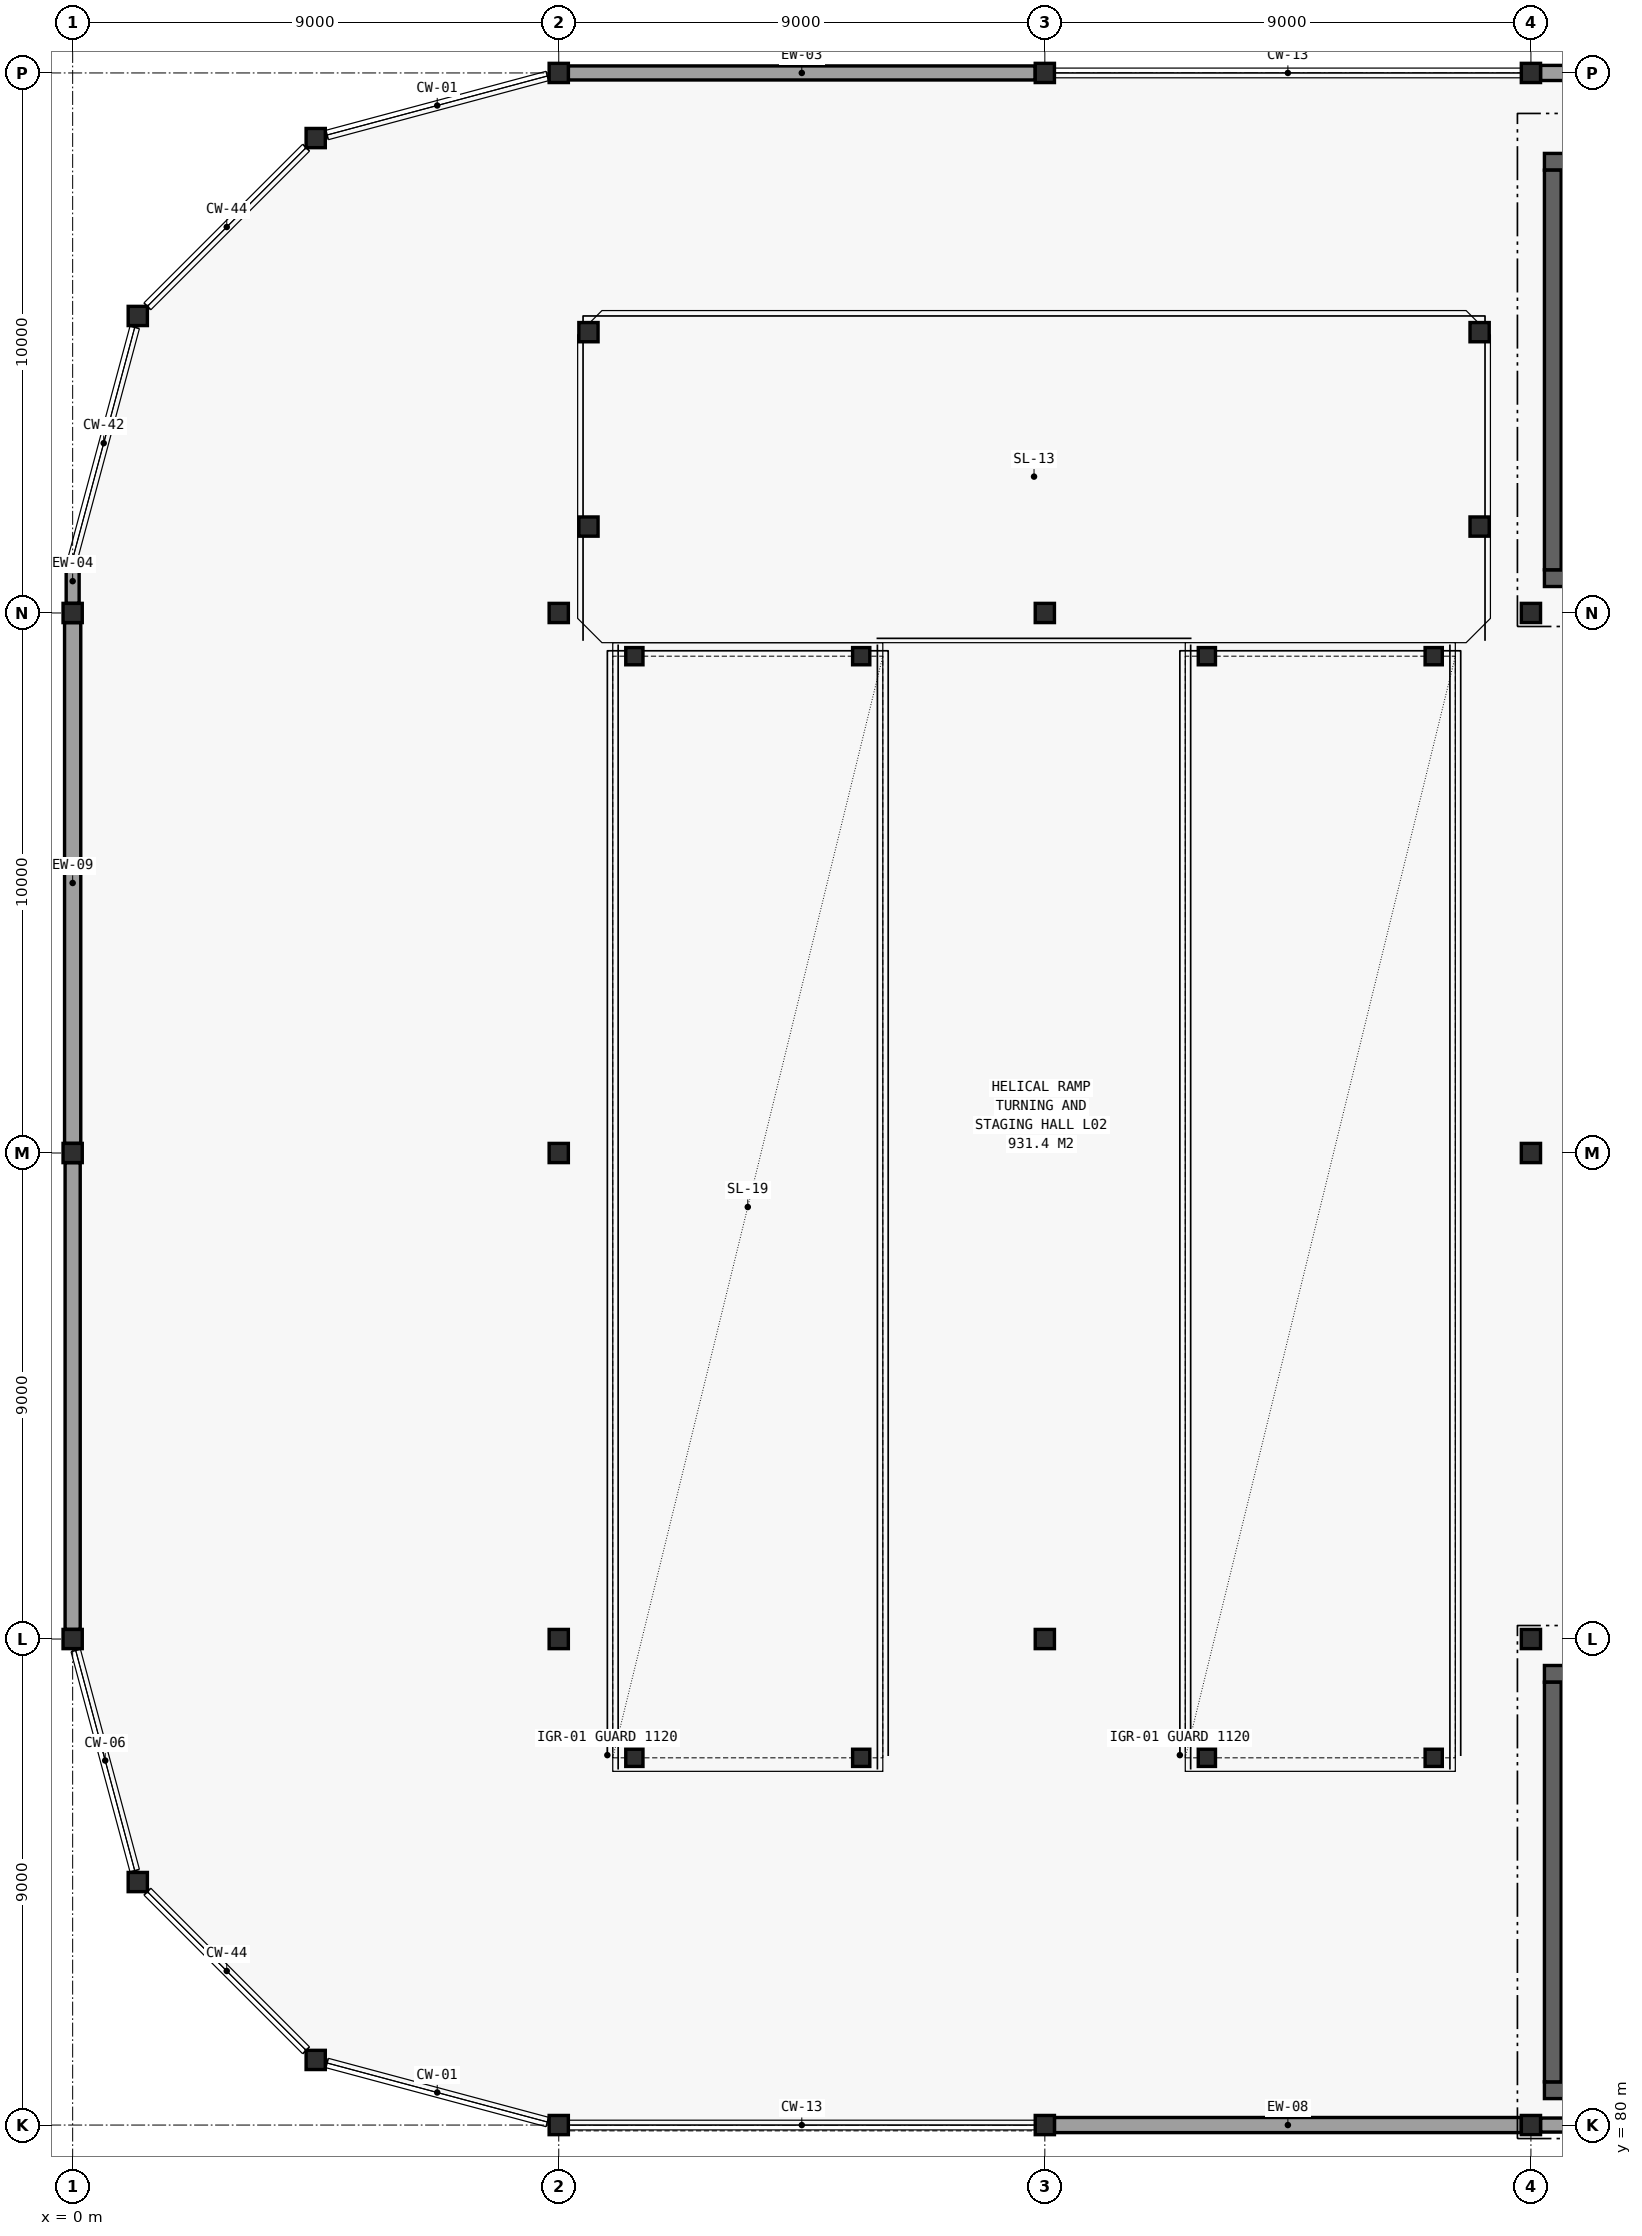
"""IFC4 building model, lengths in metres.
Left out: names, types, materials, properties, quantities, classifications, styles, units other than length and angle.
Written with IfcOpenShell. Run it as: python <this file> out.ifc"""

import sys

from ifc_helpers import new_model, si_unit, direction, frame, frame_2d, origin, origin_2d, place, context, subcontext, project, spatial, rectangle, hollow_circle, extrude, element, save


model = new_model("IFC4")
c1 = context("Model", 3, precision=1e-05, world=origin(), true_north=direction((0.0, 1.0)))
c2 = subcontext(c1, "Body", "Model", "MODEL_VIEW")
j1 = project(units=[si_unit("LENGTHUNIT", "METRE"), si_unit("PLANEANGLEUNIT", "RADIAN")], contexts=[c1])
p1 = place(None, origin())
s1 = spatial("IfcSite", under=j1, at=p1, CompositionType="ELEMENT")
p2 = place(p1, origin())
s2 = spatial("IfcBuilding", under=s1, at=p2, CompositionType="ELEMENT")
p3 = place(p2, frame((0.0, 0.0, 9.3)))
s3 = spatial("IfcBuildingStorey", under=s2, at=p3, CompositionType="ELEMENT", Elevation=9.3)
for number, where, z_axis, x_axis in (
    (1, (0.0, 89.0, 0.0), (0.0, 0.0, 1.0), (1.0, 0.0, 0.0)),
    (2, (0.0, 98.0, 0.0), (0.0, 0.0, 1.0), (1.0, 0.0, 0.0)),
    (3, (0.0, 108.0, 0.0), (0.0, 0.0, 1.0), (1.0, 0.0, 0.0)),
    (4, (1.206, 84.5, 0.0), (0.0, 0.0, 1.0), (1.0, 0.0, 0.0)),
    (5, (1.206, 113.5, 0.0), (0.0, 0.0, 1.0), (1.0, 0.0, 0.0)),
    (6, (4.5, 81.206, 0.0), (0.0, 0.0, 1.0), (1.0, 0.0, 0.0)),
    (7, (4.5, 116.794, 0.0), (0.0, 0.0, 1.0), (1.0, 0.0, 0.0)),
    (8, (9.0, 80.0, 0.0), (0.0, 0.0, 1.0), (1.0, 0.0, 0.0)),
    (9, (9.0, 89.0, 0.0), (0.0, 0.0, 1.0), (1.0, 0.0, 0.0)),
    (10, (9.0, 98.0, 0.0), (0.0, 0.0, 1.0), (1.0, 0.0, 0.0)),
    (11, (9.0, 108.0, 0.0), (0.0, 0.0, 1.0), (1.0, 0.0, 0.0)),
    (12, (9.0, 118.0, 0.0), (0.0, 0.0, 1.0), (1.0, 0.0, 0.0)),
    (13, (9.55, 109.6, 0.0), (0.0, 0.0, 1.0), (1.0, 0.0, 0.0)),
    (14, (9.55, 113.2, 0.0), (0.0, 0.0, 1.0), (1.0, 0.0, 0.0)),
):
    element("IfcColumn", number, at=place(p3, frame(where, z_axis=z_axis, x_axis=x_axis)), inside=s3, PredefinedType="COLUMN", context=c2, shape_type="SweptSolid", body=[
        extrude(hollow_circle(Radius=0.178, WallThickness=0.013, at=origin_2d()), origin(), (0.0, 0.0, 1.0), 4.2),
    ])
p4 = place(p3, frame((10.4, 86.8, 0.0), z_axis=(0.0, 0.0, 1.0), x_axis=(1.0, 0.0, 0.0)))
e15 = element("IfcColumn", 15, at=p4, inside=s3, PredefinedType="COLUMN", context=c2, shape_type="SweptSolid", body=[
    extrude(hollow_circle(Radius=0.159, WallThickness=0.01, at=origin_2d()), origin(), (0.0, 0.0, 1.0), 3.8),
])
p5 = place(p3, frame((10.4, 107.2, 0.0), z_axis=(0.0, 0.0, 1.0), x_axis=(1.0, 0.0, 0.0)))
e16 = element("IfcColumn", 16, at=p5, inside=s3, PredefinedType="COLUMN", context=c2, shape_type="SweptSolid", body=[
    extrude(hollow_circle(Radius=0.159, WallThickness=0.01, at=origin_2d()), origin(), (0.0, 0.0, 1.0), 4.2),
])
p6 = place(p3, frame((14.6, 86.8, 0.0), z_axis=(0.0, 0.0, 1.0), x_axis=(1.0, 0.0, 0.0)))
e17 = element("IfcColumn", 17, at=p6, inside=s3, PredefinedType="COLUMN", context=c2, shape_type="SweptSolid", body=[
    extrude(hollow_circle(Radius=0.159, WallThickness=0.01, at=origin_2d()), origin(), (0.0, 0.0, 1.0), 3.8),
])
p7 = place(p3, frame((14.6, 107.2, 0.0), z_axis=(0.0, 0.0, 1.0), x_axis=(1.0, 0.0, 0.0)))
e18 = element("IfcColumn", 18, at=p7, inside=s3, PredefinedType="COLUMN", context=c2, shape_type="SweptSolid", body=[
    extrude(hollow_circle(Radius=0.159, WallThickness=0.01, at=origin_2d()), origin(), (0.0, 0.0, 1.0), 4.2),
])
for number, where, z_axis, x_axis in (
    (19, (18.0, 80.0, 0.0), (0.0, 0.0, 1.0), (1.0, 0.0, 0.0)),
    (20, (18.0, 89.0, 0.0), (0.0, 0.0, 1.0), (1.0, 0.0, 0.0)),
    (21, (18.0, 108.0, 0.0), (0.0, 0.0, 1.0), (1.0, 0.0, 0.0)),
    (22, (18.0, 118.0, 0.0), (0.0, 0.0, 1.0), (1.0, 0.0, 0.0)),
):
    element("IfcColumn", number, at=place(p3, frame(where, z_axis=z_axis, x_axis=x_axis)), inside=s3, PredefinedType="COLUMN", context=c2, shape_type="SweptSolid", body=[
        extrude(hollow_circle(Radius=0.178, WallThickness=0.013, at=origin_2d()), origin(), (0.0, 0.0, 1.0), 4.2),
    ])
for number, where, z_axis, x_axis in (
    (23, (21.0, 86.8, 0.0), (0.0, 0.0, 1.0), (1.0, 0.0, 0.0)),
    (24, (21.0, 107.2, 0.0), (0.0, 0.0, 1.0), (1.0, 0.0, 0.0)),
    (25, (25.2, 86.8, 0.0), (0.0, 0.0, 1.0), (1.0, 0.0, 0.0)),
    (26, (25.2, 107.2, 0.0), (0.0, 0.0, 1.0), (1.0, 0.0, 0.0)),
):
    element("IfcColumn", number, at=place(p3, frame(where, z_axis=z_axis, x_axis=x_axis)), inside=s3, PredefinedType="COLUMN", context=c2, shape_type="SweptSolid", body=[
        extrude(hollow_circle(Radius=0.159, WallThickness=0.01, at=origin_2d()), origin(), (0.0, 0.0, 1.0), 4.2),
    ])
for number, where, z_axis, x_axis in (
    (27, (26.05, 109.6, 0.0), (0.0, 0.0, 1.0), (1.0, 0.0, 0.0)),
    (28, (26.05, 113.2, 0.0), (0.0, 0.0, 1.0), (1.0, 0.0, 0.0)),
    (29, (27.0, 80.0, 0.0), (0.0, 0.0, 1.0), (1.0, 0.0, 0.0)),
    (30, (27.0, 89.0, 0.0), (0.0, 0.0, 1.0), (1.0, 0.0, 0.0)),
    (31, (27.0, 98.0, 0.0), (0.0, 0.0, 1.0), (1.0, 0.0, 0.0)),
    (32, (27.0, 108.0, 0.0), (0.0, 0.0, 1.0), (1.0, 0.0, 0.0)),
    (33, (27.0, 118.0, 0.0), (0.0, 0.0, 1.0), (1.0, 0.0, 0.0)),
):
    element("IfcColumn", number, at=place(p3, frame(where, z_axis=z_axis, x_axis=x_axis)), inside=s3, PredefinedType="COLUMN", context=c2, shape_type="SweptSolid", body=[
        extrude(hollow_circle(Radius=0.178, WallThickness=0.013, at=origin_2d()), origin(), (0.0, 0.0, 1.0), 4.2),
    ])
p8 = place(p3, frame((18.178, 80.0, 0.0), z_axis=(0.0, 0.0, 1.0), x_axis=(1.0, 0.0, 0.0)))
e34 = element("IfcWall", 34, at=p8, inside=s3, PredefinedType="SOLIDWALL", context=c2, shape_type="SweptSolid", body=[
    extrude(rectangle(XDim=8.645, YDim=0.28, at=frame_2d((4.322, 0.0))), origin(), (0.0, 0.0, 1.0), 3.25),
])
p9 = place(p3, frame((27.178, 80.0, 0.0), z_axis=(0.0, 0.0, 1.0), x_axis=(1.0, 0.0, 0.0)))
e35 = element("IfcWall", 35, at=p9, inside=s3, PredefinedType="SOLIDWALL", context=c2, shape_type="SweptSolid", body=[
    extrude(rectangle(XDim=8.645, YDim=0.26, at=frame_2d((4.322, 0.0))), origin(), (0.0, 0.0, 1.0), 3.25),
])
p10 = place(p3, frame((35.822, 118.0, 0.0), z_axis=(0.0, 0.0, 1.0), x_axis=(-1.0, 0.0, 0.0)))
e36 = element("IfcWall", 36, at=p10, inside=s3, PredefinedType="SOLIDWALL", context=c2, shape_type="SweptSolid", body=[
    extrude(rectangle(XDim=8.645, YDim=0.28, at=frame_2d((4.322, 0.0))), origin(), (0.0, 0.0, 1.0), 3.25),
])
p11 = place(p3, frame((17.822, 118.0, 0.0), z_axis=(0.0, 0.0, 1.0), x_axis=(-1.0, 0.0, 0.0)))
e37 = element("IfcWall", 37, at=p11, inside=s3, PredefinedType="SOLIDWALL", context=c2, shape_type="SweptSolid", body=[
    extrude(rectangle(XDim=8.645, YDim=0.26, at=frame_2d((4.322, 0.0))), origin(), (0.0, 0.0, 1.0), 3.25),
])
p12 = place(p3, frame((0.0, 109.0, 0.0), z_axis=(0.0, 0.0, 1.0), x_axis=(0.0, -1.0, 0.0)))
e38 = element("IfcWall", 38, at=p12, inside=s3, PredefinedType="SOLIDWALL", context=c2, shape_type="SweptSolid", body=[
    extrude(rectangle(XDim=0.822, YDim=0.24, at=frame_2d((0.411, 0.0))), origin(), (0.0, 0.0, 1.0), 3.3),
])
p13 = place(p3, frame((0.0, 107.822, 0.0), z_axis=(0.0, 0.0, 1.0), x_axis=(0.0, -1.0, 0.0)))
e39 = element("IfcWall", 39, at=p13, inside=s3, PredefinedType="SOLIDWALL", context=c2, shape_type="SweptSolid", body=[
    extrude(rectangle(XDim=9.645, YDim=0.3, at=frame_2d((4.822, 0.0))), origin(), (0.0, 0.0, 1.0), 3.25),
])
p14 = place(p3, frame((0.0, 97.822, 0.0), z_axis=(0.0, 0.0, 1.0), x_axis=(0.0, -1.0, 0.0)))
e40 = element("IfcWall", 40, at=p14, inside=s3, PredefinedType="SOLIDWALL", context=c2, shape_type="SweptSolid", body=[
    extrude(rectangle(XDim=8.645, YDim=0.28, at=frame_2d((4.322, 0.0))), origin(), (0.0, 0.0, 1.0), 3.25),
])
for number, where, z_axis, x_axis in (
    (41, (27.25, 80.645, 0.0), (0.0, 0.0, 1.0), (1.0, 0.0, 0.0)),
    (42, (27.25, 88.355, 0.0), (0.0, 0.0, 1.0), (1.0, 0.0, 0.0)),
):
    element("IfcWall", number, at=place(p3, frame(where, z_axis=z_axis, x_axis=x_axis)), inside=s3, PredefinedType="SHEAR", context=c2, shape_type="SweptSolid", body=[
        extrude(rectangle(XDim=3.9, YDim=0.31, at=frame_2d((1.95, 0.0))), origin(), (0.0, 0.0, 1.0), 3.95),
    ])
p15 = place(p3, frame((27.405, 80.8, 0.0), z_axis=(0.0, 0.0, 1.0), x_axis=(0.0, 1.0, 0.0)))
e43 = element("IfcWall", 43, at=p15, inside=s3, PredefinedType="SHEAR", context=c2, shape_type="SweptSolid", body=[
    extrude(rectangle(XDim=7.4, YDim=0.31, at=frame_2d((3.7, 0.0))), origin(), (0.0, 0.0, 1.0), 3.95),
])
for number, where, z_axis, x_axis in (
    (44, (27.25, 108.645, 0.0), (0.0, 0.0, 1.0), (1.0, 0.0, 0.0)),
    (45, (27.25, 116.355, 0.0), (0.0, 0.0, 1.0), (1.0, 0.0, 0.0)),
):
    element("IfcWall", number, at=place(p3, frame(where, z_axis=z_axis, x_axis=x_axis)), inside=s3, PredefinedType="SHEAR", context=c2, shape_type="SweptSolid", body=[
        extrude(rectangle(XDim=3.9, YDim=0.31, at=frame_2d((1.95, 0.0))), origin(), (0.0, 0.0, 1.0), 3.95),
    ])
p16 = place(p3, frame((27.405, 108.8, 0.0), z_axis=(0.0, 0.0, 1.0), x_axis=(0.0, 1.0, 0.0)))
e46 = element("IfcWall", 46, at=p16, inside=s3, PredefinedType="SHEAR", context=c2, shape_type="SweptSolid", body=[
    extrude(rectangle(XDim=7.4, YDim=0.31, at=frame_2d((3.7, 0.0))), origin(), (0.0, 0.0, 1.0), 3.95),
])
save(model, sys.argv[1])
